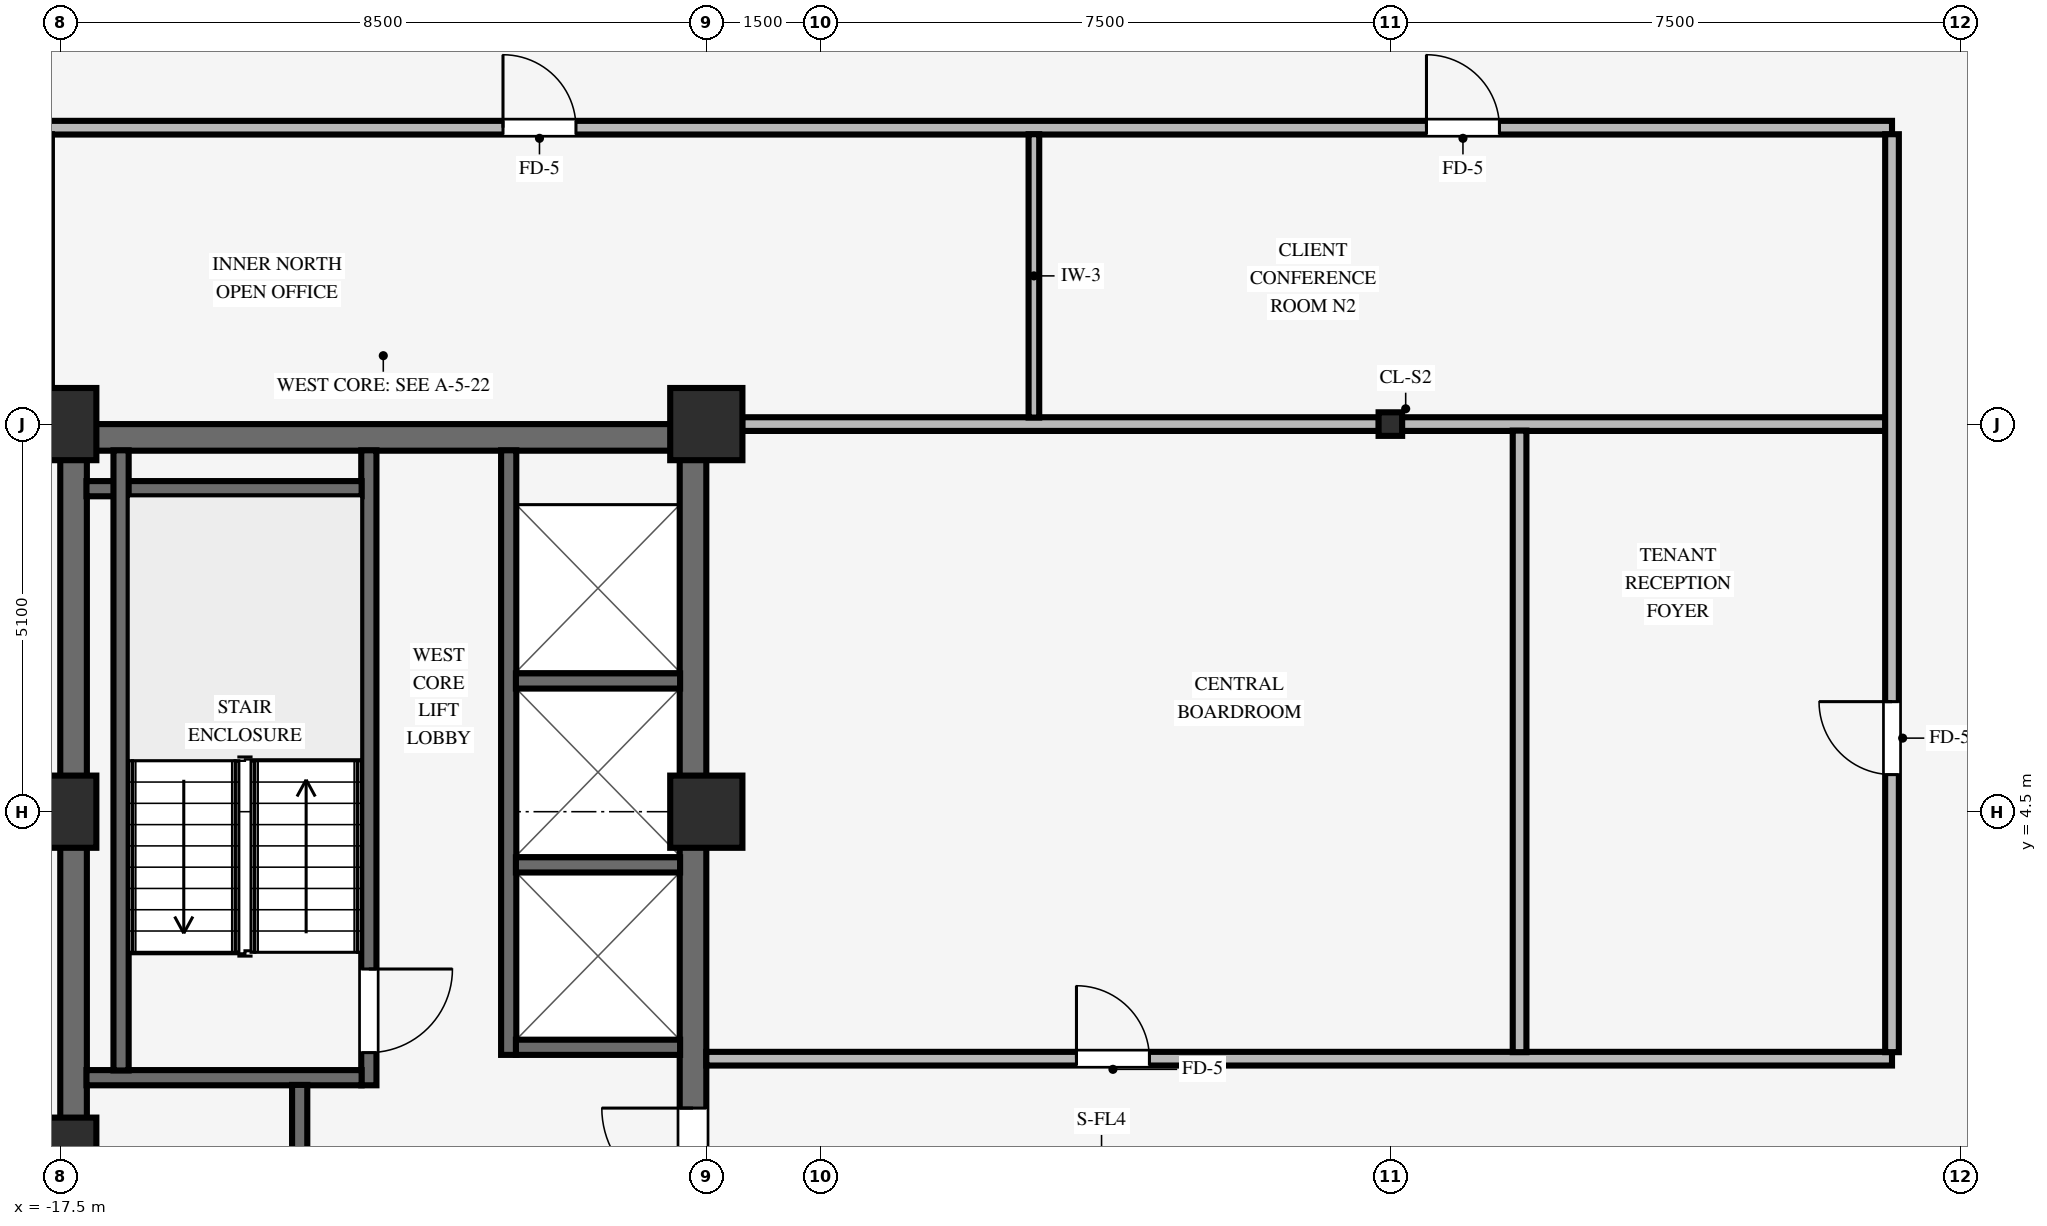
"""IFC4 building model, lengths in metres.
Left out: names, types, materials, properties, quantities, classifications, styles, units other than length and angle.
Written with IfcOpenShell. Run it as: python <this file> out.ifc"""

import sys

from ifc_helpers import new_model, si_unit, direction, frame, frame_2d, origin, origin_2d, place, context, subcontext, project, spatial, rectangle, i_section, extrude, source, transform, mapped, element, fill, save


model = new_model("IFC4")
c1 = context("Model", 3, precision=1e-05, world=origin(), true_north=direction((0.0, 1.0)))
c2 = subcontext(c1, "Body", "Model", "MODEL_VIEW")
j1 = project(units=[si_unit("LENGTHUNIT", "METRE"), si_unit("PLANEANGLEUNIT", "RADIAN")], contexts=[c1])
p1 = place(None, origin())
s1 = spatial("IfcSite", under=j1, at=p1, CompositionType="ELEMENT")
p2 = place(p1, origin())
s2 = spatial("IfcBuilding", under=s1, at=p2, CompositionType="ELEMENT")
p3 = place(p2, frame((0.0, 0.0, 220.1)))
s3 = spatial("IfcBuildingStorey", under=s2, at=p3, CompositionType="ELEMENT", Elevation=220.1)
p4 = place(p3, frame((-17.5, 9.425, 0.0), z_axis=(0.0, 0.0, 1.0), x_axis=(1.0, 0.0, 0.0)))
e1 = element("IfcWall", 1, at=p4, inside=s3, PredefinedType="SHEAR", context=c2, shape_type="SweptSolid", body=[
    extrude(rectangle(XDim=8.5, YDim=0.35, at=frame_2d((4.25, 0.0))), origin(), (0.0, 0.0, 1.0), 3.37),
])
p5 = place(p3, frame((-17.325, -9.255, 0.0), z_axis=(0.0, 0.0, 1.0), x_axis=(0.0, 1.0, 0.0)))
e2 = element("IfcWall", 2, at=p5, inside=s3, PredefinedType="SHEAR", context=c2, shape_type="SweptSolid", body=[
    extrude(rectangle(XDim=18.51, YDim=0.35, at=frame_2d((9.255, 0.0))), origin(), (0.0, 0.0, 1.0), 3.37),
])
p6 = place(p3, frame((-9.175, -9.255, 0.0), z_axis=(0.0, 0.0, 1.0), x_axis=(0.0, 1.0, 0.0)))
e3 = element("IfcWall", 3, at=p6, inside=s3, PredefinedType="SHEAR", context=c2, shape_type="SweptSolid", body=[
    extrude(rectangle(XDim=18.51, YDim=0.35, at=frame_2d((9.255, 0.0))), origin(), (0.0, 0.0, 1.0), 3.37),
])
p7 = place(p6, frame((8.655, 0.0, 0.0)))
e4 = element("IfcOpeningElement", 4, at=p7, cuts=e3, PredefinedType="OPENING", context=c2, shape_type="SweptSolid", body=[
    extrude(rectangle(XDim=1.2, YDim=2.15, at=frame_2d((0.6, 1.075))), frame((0.0, 0.185, 0.0), z_axis=(0.0, -1.0, 0.0), x_axis=(1.0, 0.0, 0.0)), (0.0, 0.0, 1.0), 0.37),
])
for number, where, z_axis, x_axis in (
    (5, (-17.5, 4.5, 0.0), (0.0, 0.0, 1.0), (1.0, 0.0, 0.0)),
    (6, (-17.5, 9.6, 0.0), (0.0, 0.0, 1.0), (1.0, 0.0, 0.0)),
    (7, (-9.0, 4.5, 0.0), (0.0, 0.0, 1.0), (1.0, 0.0, 0.0)),
    (8, (-9.0, 9.6, 0.0), (0.0, 0.0, 1.0), (1.0, 0.0, 0.0)),
    (9, (-17.5, 0.0, 0.0), (0.0, 0.0, 1.0), (1.0, 0.0, 0.0)),
):
    element("IfcColumn", number, at=place(p3, frame(where, z_axis=z_axis, x_axis=x_axis)), inside=s3, PredefinedType="COLUMN", context=c2, shape_type="SweptSolid", body=[
        extrude(rectangle(XDim=0.95, YDim=0.95, at=origin_2d()), origin(), (0.0, 0.0, 1.0), 3.37),
    ])
p8 = place(p3, frame((0.0, 9.6, 0.0), z_axis=(0.0, 0.0, 1.0), x_axis=(1.0, 0.0, 0.0)))
e10 = element("IfcColumn", 10, at=p8, inside=s3, PredefinedType="COLUMN", context=c2, shape_type="SweptSolid", body=[
    extrude(i_section(OverallWidth=0.31, OverallDepth=0.31, WebThickness=0.015, FlangeThickness=0.015, FilletRadius=0.015, at=origin_2d()), origin(), (0.0, 0.0, 1.0), 3.37),
])
p9 = place(p3, frame((-13.44, 0.9, 0.0), z_axis=(0.0, 0.0, 1.0), x_axis=(0.0, 1.0, 0.0)))
e11 = element("IfcWall", 11, at=p9, inside=s3, PredefinedType="SHEAR", context=c2, shape_type="SweptSolid", body=[
    extrude(rectangle(XDim=8.355, YDim=0.2, at=frame_2d((4.177, 0.0))), origin(), (0.0, 0.0, 1.0), 3.37),
])
p10 = place(p9, frame((1.53, 0.0, 0.0), z_axis=(0.0, 0.0, 1.0), x_axis=(-1.0, 0.0, 0.0)))
e12 = element("IfcOpeningElement", 12, at=p10, cuts=e11, PredefinedType="OPENING", context=c2, shape_type="SweptSolid", body=[
    extrude(rectangle(XDim=1.1, YDim=2.15, at=frame_2d((0.55, 1.075))), frame((0.0, 0.11, 0.0), z_axis=(0.0, -1.0, 0.0), x_axis=(1.0, 0.0, 0.0)), (0.0, 0.0, 1.0), 0.22),
])
for number, where, z_axis, x_axis in (
    (13, (-17.155, 1.0, 0.0), (0.0, 0.0, 1.0), (1.0, 0.0, 0.0)),
    (14, (-17.155, 8.75, 0.0), (0.0, 0.0, 1.0), (1.0, 0.0, 0.0)),
):
    element("IfcWall", number, at=place(p3, frame(where, z_axis=z_axis, x_axis=x_axis)), inside=s3, PredefinedType="SHEAR", context=c2, shape_type="SweptSolid", body=[
        extrude(rectangle(XDim=3.62, YDim=0.2, at=frame_2d((1.81, 0.0))), origin(), (0.0, 0.0, 1.0), 3.37),
    ])
p11 = place(p3, frame((-16.7, 1.095, 0.0), z_axis=(0.0, 0.0, 1.0), x_axis=(0.0, 1.0, 0.0)))
e15 = element("IfcWall", 15, at=p11, inside=s3, PredefinedType="SHEAR", context=c2, shape_type="SweptSolid", body=[
    extrude(rectangle(XDim=8.16, YDim=0.2, at=frame_2d((4.08, 0.0))), origin(), (0.0, 0.0, 1.0), 3.37),
])
p12 = place(p3, frame((-14.35, -6.2, 0.0), z_axis=(0.0, 0.0, 1.0), x_axis=(0.0, 1.0, 0.0)))
e16 = element("IfcWall", 16, at=p12, inside=s3, PredefinedType="SHEAR", context=c2, shape_type="SweptSolid", body=[
    extrude(rectangle(XDim=7.105, YDim=0.2, at=frame_2d((3.552, 0.0))), origin(), (0.0, 0.0, 1.0), 3.37),
])
p13 = place(p12, frame((5.69, 0.0, 0.0), z_axis=(0.0, 0.0, 1.0), x_axis=(-1.0, 0.0, 0.0)))
e17 = element("IfcOpeningElement", 17, at=p13, cuts=e16, PredefinedType="OPENING", context=c2, shape_type="SweptSolid", body=[
    extrude(rectangle(XDim=0.88, YDim=2.1, at=frame_2d((0.44, 1.05))), frame((0.0, 0.11, 0.0), z_axis=(0.0, -1.0, 0.0), x_axis=(1.0, 0.0, 0.0)), (0.0, 0.0, 1.0), 0.22),
])
p14 = place(p12, frame((1.15, 0.0, 0.0)))
e18 = element("IfcOpeningElement", 18, at=p14, cuts=e16, PredefinedType="OPENING", context=c2, shape_type="SweptSolid", body=[
    extrude(rectangle(XDim=1.3, YDim=2.2, at=frame_2d((0.65, 1.1))), frame((0.0, 0.11, 0.0), z_axis=(0.0, -1.0, 0.0), x_axis=(1.0, 0.0, 0.0)), (0.0, 0.0, 1.0), 0.22),
])
p15 = place(p3, frame((-11.6, 1.3, 0.0), z_axis=(0.0, 0.0, 1.0), x_axis=(0.0, 1.0, 0.0)))
e19 = element("IfcWall", 19, at=p15, inside=s3, PredefinedType="SHEAR", context=c2, shape_type="SweptSolid", body=[
    extrude(rectangle(XDim=7.955, YDim=0.2, at=frame_2d((3.978, 0.0))), origin(), (0.0, 0.0, 1.0), 3.37),
])
for number, where, z_axis, x_axis in (
    (20, (-11.505, 1.4, 0.0), (0.0, 0.0, 1.0), (1.0, 0.0, 0.0)),
    (21, (-11.505, 3.8, 0.0), (0.0, 0.0, 1.0), (1.0, 0.0, 0.0)),
    (22, (-11.505, 6.22, 0.0), (0.0, 0.0, 1.0), (1.0, 0.0, 0.0)),
):
    element("IfcWall", number, at=place(p3, frame(where, z_axis=z_axis, x_axis=x_axis)), inside=s3, PredefinedType="SHEAR", context=c2, shape_type="SweptSolid", body=[
        extrude(rectangle(XDim=2.16, YDim=0.2, at=frame_2d((1.08, 0.0))), origin(), (0.0, 0.0, 1.0), 3.37),
    ])
p16 = place(p3, frame((-9.0, 1.25, 0.0), z_axis=(0.0, 0.0, 1.0), x_axis=(1.0, 0.0, 0.0)))
e23 = element("IfcWall", 23, at=p16, inside=s3, PredefinedType="PARTITIONING", context=c2, shape_type="SweptSolid", body=[
    extrude(rectangle(XDim=15.6, YDim=0.18, at=frame_2d((7.8, 0.0))), origin(), (0.0, 0.0, 1.0), 3.36),
])
p17 = place(p16, frame((4.87, 0.0, 0.0)))
e24 = element("IfcOpeningElement", 24, at=p17, cuts=e23, PredefinedType="OPENING", context=c2, shape_type="SweptSolid", body=[
    extrude(rectangle(XDim=0.96, YDim=2.1, at=frame_2d((0.48, 1.05))), frame((0.0, 0.1, 0.0), z_axis=(0.0, -1.0, 0.0), x_axis=(1.0, 0.0, 0.0)), (0.0, 0.0, 1.0), 0.2),
])
p18 = place(p3, frame((-8.529, 9.6, 0.0), z_axis=(0.0, 0.0, 1.0), x_axis=(1.0, 0.0, 0.0)))
e25 = element("IfcWall", 25, at=p18, inside=s3, PredefinedType="PARTITIONING", context=c2, shape_type="SweptSolid", body=[
    extrude(rectangle(XDim=8.378, YDim=0.18, at=frame_2d((4.189, 0.0))), origin(), (0.0, 0.0, 1.0), 2.405),
])
p19 = place(p3, frame((0.151, 9.6, 0.0), z_axis=(0.0, 0.0, 1.0), x_axis=(1.0, 0.0, 0.0)))
e26 = element("IfcWall", 26, at=p19, inside=s3, PredefinedType="PARTITIONING", context=c2, shape_type="SweptSolid", body=[
    extrude(rectangle(XDim=6.363, YDim=0.18, at=frame_2d((3.182, 0.0))), origin(), (0.0, 0.0, 1.0), 2.405),
])
p20 = place(p3, frame((-17.7, 13.5, 0.0), z_axis=(0.0, 0.0, 1.0), x_axis=(1.0, 0.0, 0.0)))
e27 = element("IfcWall", 27, at=p20, inside=s3, PredefinedType="PARTITIONING", context=c2, shape_type="SweptSolid", body=[
    extrude(rectangle(XDim=24.3, YDim=0.18, at=frame_2d((12.15, 0.0))), origin(), (0.0, 0.0, 1.0), 3.008),
])
p21 = place(p20, frame((6.025, 0.0, 0.0)))
e28 = element("IfcOpeningElement", 28, at=p21, cuts=e27, PredefinedType="OPENING", context=c2, shape_type="SweptSolid", body=[
    extrude(rectangle(XDim=0.96, YDim=2.1, at=frame_2d((0.48, 1.05))), frame((0.0, 0.1, 0.0), z_axis=(0.0, -1.0, 0.0), x_axis=(1.0, 0.0, 0.0)), (0.0, 0.0, 1.0), 0.2),
])
p22 = place(p20, frame((18.175, 0.0, 0.0)))
e29 = element("IfcOpeningElement", 29, at=p22, cuts=e27, PredefinedType="OPENING", context=c2, shape_type="SweptSolid", body=[
    extrude(rectangle(XDim=0.96, YDim=2.1, at=frame_2d((0.48, 1.05))), frame((0.0, 0.1, 0.0), z_axis=(0.0, -1.0, 0.0), x_axis=(1.0, 0.0, 0.0)), (0.0, 0.0, 1.0), 0.2),
])
p23 = place(p3, frame((-4.69, 9.686, 0.0), z_axis=(0.0, 0.0, 1.0), x_axis=(0.0, 1.0, 0.0)))
e30 = element("IfcWall", 30, at=p23, inside=s3, PredefinedType="PARTITIONING", context=c2, shape_type="SweptSolid", body=[
    extrude(rectangle(XDim=3.728, YDim=0.14, at=frame_2d((1.864, 0.0))), origin(), (0.0, 0.0, 1.0), 3.36),
])
p24 = place(p3, frame((1.7, 1.336, 0.0), z_axis=(0.0, 0.0, 1.0), x_axis=(0.0, 1.0, 0.0)))
e31 = element("IfcWall", 31, at=p24, inside=s3, PredefinedType="PARTITIONING", context=c2, shape_type="SweptSolid", body=[
    extrude(rectangle(XDim=8.178, YDim=0.18, at=frame_2d((4.089, 0.0))), origin(), (0.0, 0.0, 1.0), 3.36),
])
p25 = place(p3, frame((6.6, 1.336, 0.0), z_axis=(0.0, 0.0, 1.0), x_axis=(0.0, 1.0, 0.0)))
e32 = element("IfcWall", 32, at=p25, inside=s3, PredefinedType="PARTITIONING", context=c2, shape_type="SweptSolid", body=[
    extrude(rectangle(XDim=12.078, YDim=0.18, at=frame_2d((6.039, 0.0))), origin(), (0.0, 0.0, 1.0), 3.36),
])
p26 = place(p25, frame((3.652, 0.0, 0.0)))
e33 = element("IfcOpeningElement", 33, at=p26, cuts=e32, PredefinedType="OPENING", context=c2, shape_type="SweptSolid", body=[
    extrude(rectangle(XDim=0.96, YDim=2.1, at=frame_2d((0.48, 1.05))), frame((0.0, 0.1, 0.0), z_axis=(0.0, -1.0, 0.0), x_axis=(1.0, 0.0, 0.0)), (0.0, 0.0, 1.0), 0.2),
])
m1 = source(origin(), c2, "Body", "SweptSolid", [
    extrude(rectangle(XDim=1.1, YDim=2.15, at=frame_2d((0.55, 1.075))), frame((0.0, 0.025, 0.0), z_axis=(0.0, -1.0, 0.0), x_axis=(1.0, 0.0, 0.0)), (0.0, 0.0, 1.0), 0.05),
])
p27 = place(p10, origin())
e34 = element("IfcDoor", 34, at=p27, inside=s3, OperationType="SINGLE_SWING_LEFT", PredefinedType="DOOR", context=c2, shape_type="MappedRepresentation", body=[
    mapped(m1, transform((0.0, 0.0, 0.0), scale=1.0)),
])
fill(e12, e34)
m2 = source(origin(), c2, "Body", "SweptSolid", [
    extrude(rectangle(XDim=1.2, YDim=2.15, at=frame_2d((0.6, 1.075))), frame((0.0, 0.025, 0.0), z_axis=(0.0, -1.0, 0.0), x_axis=(1.0, 0.0, 0.0)), (0.0, 0.0, 1.0), 0.05),
])
p28 = place(p7, origin())
e35 = element("IfcDoor", 35, at=p28, inside=s3, OperationType="SINGLE_SWING_RIGHT", PredefinedType="DOOR", context=c2, shape_type="MappedRepresentation", body=[
    mapped(m2, transform((0.0, 0.0, 0.0), scale=1.0)),
])
fill(e4, e35)
m3 = source(origin(), c2, "Body", "SweptSolid", [
    extrude(rectangle(XDim=0.96, YDim=2.1, at=frame_2d((0.48, 1.05))), frame((0.0, 0.025, 0.0), z_axis=(0.0, -1.0, 0.0), x_axis=(1.0, 0.0, 0.0)), (0.0, 0.0, 1.0), 0.05),
])
p29 = place(p21, origin())
e36 = element("IfcDoor", 36, at=p29, inside=s3, OperationType="SINGLE_SWING_LEFT", PredefinedType="DOOR", context=c2, shape_type="MappedRepresentation", body=[
    mapped(m3, transform((0.0, 0.0, 0.0), scale=1.0)),
])
fill(e28, e36)
p30 = place(p22, origin())
e37 = element("IfcDoor", 37, at=p30, inside=s3, OperationType="SINGLE_SWING_LEFT", PredefinedType="DOOR", context=c2, shape_type="MappedRepresentation", body=[
    mapped(m3, transform((0.0, 0.0, 0.0), scale=1.0)),
])
fill(e29, e37)
p31 = place(p17, origin())
e38 = element("IfcDoor", 38, at=p31, inside=s3, OperationType="SINGLE_SWING_LEFT", PredefinedType="DOOR", context=c2, shape_type="MappedRepresentation", body=[
    mapped(m3, transform((0.0, 0.0, 0.0), scale=1.0)),
])
fill(e24, e38)
p32 = place(p26, origin())
e39 = element("IfcDoor", 39, at=p32, inside=s3, OperationType="SINGLE_SWING_RIGHT", PredefinedType="DOOR", context=c2, shape_type="MappedRepresentation", body=[
    mapped(m3, transform((0.0, 0.0, 0.0), scale=1.0)),
])
fill(e33, e39)
save(model, sys.argv[1])
